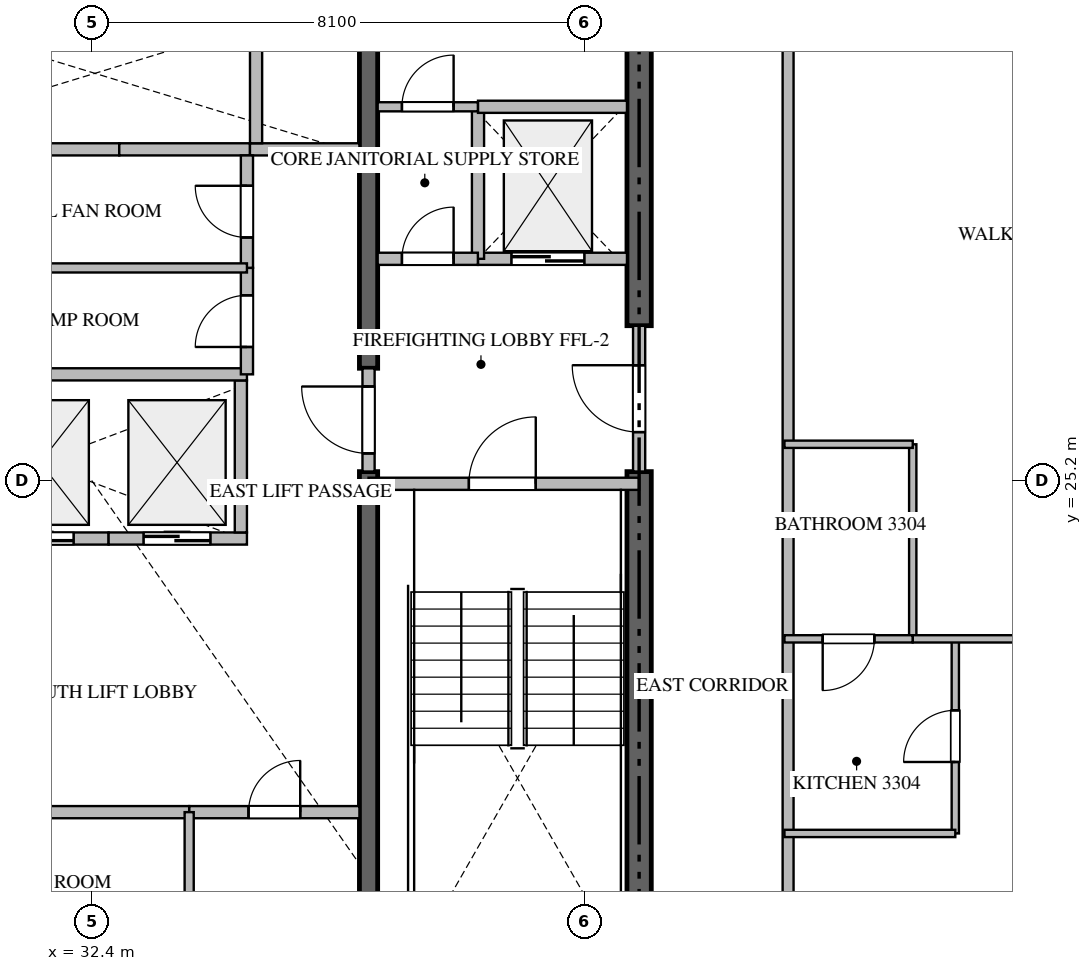
"""IFC4 building model, lengths in metres.
Left out: names, types, materials, properties, quantities, classifications, styles, units other than length and angle.
Written with IfcOpenShell. Run it as: python <this file> out.ifc"""

import sys

from ifc_helpers import new_model, si_unit, direction, frame, frame_2d, origin, place, context, subcontext, project, spatial, rectangle, extrude, source, transform, mapped, element, fill, save


model = new_model("IFC4")
c1 = context("Model", 3, precision=1e-05, world=origin(), true_north=direction((0.0, 1.0)))
c2 = subcontext(c1, "Body", "Model", "MODEL_VIEW")
j1 = project(units=[si_unit("LENGTHUNIT", "METRE"), si_unit("PLANEANGLEUNIT", "RADIAN")], contexts=[c1])
p1 = place(None, origin())
s1 = spatial("IfcSite", under=j1, at=p1, CompositionType="ELEMENT")
p2 = place(p1, origin())
s2 = spatial("IfcBuilding", under=s1, at=p2, CompositionType="ELEMENT")
p3 = place(p2, frame((0.0, 0.0, 135.15)))
s3 = spatial("IfcBuildingStorey", under=s2, at=p3, CompositionType="ELEMENT", Elevation=135.15)
p4 = place(p3, frame((41.4, 17.0, -0.26), z_axis=(0.0, 0.0, 1.0), x_axis=(0.0, 1.0, 0.0)))
e1 = element("IfcWall", 1, at=p4, inside=s3, PredefinedType="SHEAR", context=c2, shape_type="SweptSolid", body=[
    extrude(rectangle(XDim=8.35, YDim=0.4, at=frame_2d((4.175, 0.0))), origin(), (0.0, 0.0, 1.0), 3.748),
])
p5 = place(p3, frame((41.4, 27.75, -0.26), z_axis=(0.0, 0.0, 1.0), x_axis=(0.0, 1.0, 0.0)))
e2 = element("IfcWall", 2, at=p5, inside=s3, PredefinedType="SHEAR", context=c2, shape_type="SweptSolid", body=[
    extrude(rectangle(XDim=5.65, YDim=0.4, at=frame_2d((2.825, 0.0))), origin(), (0.0, 0.0, 1.0), 3.748),
])
p6 = place(p3, frame((36.95, 17.0, -0.26), z_axis=(0.0, 0.0, 1.0), x_axis=(0.0, 1.0, 0.0)))
e3 = element("IfcWall", 3, at=p6, inside=s3, PredefinedType="SHEAR", context=c2, shape_type="SweptSolid", body=[
    extrude(rectangle(XDim=8.35, YDim=0.3, at=frame_2d((4.175, 0.0))), origin(), (0.0, 0.0, 1.0), 3.748),
])
p7 = place(p3, frame((36.95, 27.05, -0.26), z_axis=(0.0, 0.0, 1.0), x_axis=(0.0, 1.0, 0.0)))
e4 = element("IfcWall", 4, at=p7, inside=s3, PredefinedType="SHEAR", context=c2, shape_type="SweptSolid", body=[
    extrude(rectangle(XDim=6.35, YDim=0.3, at=frame_2d((3.175, 0.0))), origin(), (0.0, 0.0, 1.0), 3.748),
])
p8 = place(p3, frame((36.95, 25.15, 0.0), z_axis=(0.0, 0.0, 1.0), x_axis=(1.0, 0.0, 0.0)))
e5 = element("IfcWall", 5, at=p8, inside=s3, PredefinedType="STANDARD", context=c2, shape_type="SweptSolid", body=[
    extrude(rectangle(XDim=4.45, YDim=0.2, at=frame_2d((2.225, 0.0))), origin(), (0.0, 0.0, 1.0), 3.49),
])
p9 = place(p8, frame((1.65, 0.0, 0.0)))
e6 = element("IfcOpeningElement", 6, at=p9, cuts=e5, PredefinedType="OPENING", context=c2, shape_type="SweptSolid", body=[
    extrude(rectangle(XDim=1.1, YDim=2.15, at=frame_2d((0.55, 1.075))), frame((0.0, 0.11, 0.0), z_axis=(0.0, -1.0, 0.0), x_axis=(1.0, 0.0, 0.0)), (0.0, 0.0, 1.0), 0.22),
])
p10 = place(p3, frame((38.75, 28.85, 0.0), z_axis=(0.0, 0.0, 1.0), x_axis=(1.0, 0.0, 0.0)))
e7 = element("IfcWall", 7, at=p10, inside=s3, PredefinedType="STANDARD", context=c2, shape_type="SweptSolid", body=[
    extrude(rectangle(XDim=2.45, YDim=0.2, at=frame_2d((1.225, 0.0))), origin(), (0.0, 0.0, 1.0), 3.49),
])
p11 = place(p10, frame((0.55, 0.0, 0.0)))
e8 = element("IfcOpeningElement", 8, at=p11, cuts=e7, PredefinedType="OPENING", context=c2, shape_type="SweptSolid", body=[
    extrude(rectangle(XDim=1.2, YDim=2.2, at=frame_2d((0.6, 1.1))), frame((0.0, 0.11, 0.0), z_axis=(0.0, -1.0, 0.0), x_axis=(1.0, 0.0, 0.0)), (0.0, 0.0, 1.0), 0.22),
])
p12 = place(p3, frame((30.425, 24.25, 0.0), z_axis=(0.0, 0.0, 1.0), x_axis=(1.0, 0.0, 0.0)))
e9 = element("IfcWall", 9, at=p12, inside=s3, PredefinedType="STANDARD", context=c2, shape_type="SweptSolid", body=[
    extrude(rectangle(XDim=2.25, YDim=0.2, at=frame_2d((1.125, 0.0))), origin(), (0.0, 0.0, 1.0), 3.49),
])
p13 = place(p12, frame((0.575, 0.0, 0.0)))
e10 = element("IfcOpeningElement", 10, at=p13, cuts=e9, PredefinedType="OPENING", context=c2, shape_type="SweptSolid", body=[
    extrude(rectangle(XDim=1.1, YDim=2.2, at=frame_2d((0.55, 1.1))), frame((0.0, 0.11, 0.0), z_axis=(0.0, -1.0, 0.0), x_axis=(1.0, 0.0, 0.0)), (0.0, 0.0, 1.0), 0.22),
])
p14 = place(p3, frame((32.675, 24.25, 0.0), z_axis=(0.0, 0.0, 1.0), x_axis=(1.0, 0.0, 0.0)))
e11 = element("IfcWall", 11, at=p14, inside=s3, PredefinedType="STANDARD", context=c2, shape_type="SweptSolid", body=[
    extrude(rectangle(XDim=2.275, YDim=0.2, at=frame_2d((1.137, 0.0))), origin(), (0.0, 0.0, 1.0), 3.49),
])
p15 = place(p14, frame((0.575, 0.0, 0.0)))
e12 = element("IfcOpeningElement", 12, at=p15, cuts=e11, PredefinedType="OPENING", context=c2, shape_type="SweptSolid", body=[
    extrude(rectangle(XDim=1.1, YDim=2.2, at=frame_2d((0.55, 1.1))), frame((0.0, 0.11, 0.0), z_axis=(0.0, -1.0, 0.0), x_axis=(1.0, 0.0, 0.0)), (0.0, 0.0, 1.0), 0.22),
])
p16 = place(p3, frame((34.85, 24.35, 0.0), z_axis=(0.0, 0.0, 1.0), x_axis=(0.0, 1.0, 0.0)))
e13 = element("IfcWall", 13, at=p16, inside=s3, PredefinedType="STANDARD", context=c2, shape_type="SweptSolid", body=[
    extrude(rectangle(XDim=2.5, YDim=0.2, at=frame_2d((1.25, 0.0))), origin(), (0.0, 0.0, 1.0), 3.49),
])
p17 = place(p3, frame((30.55, 30.65, 0.0), z_axis=(0.0, 0.0, 1.0), x_axis=(1.0, 0.0, 0.0)))
e14 = element("IfcWall", 14, at=p17, inside=s3, PredefinedType="STANDARD", context=c2, shape_type="SweptSolid", body=[
    extrude(rectangle(XDim=2.3, YDim=0.2, at=frame_2d((1.15, 0.0))), origin(), (0.0, 0.0, 1.0), 3.49),
])
p18 = place(p3, frame((32.85, 30.65, 0.0), z_axis=(0.0, 0.0, 1.0), x_axis=(1.0, 0.0, 0.0)))
e15 = element("IfcWall", 15, at=p18, inside=s3, PredefinedType="STANDARD", context=c2, shape_type="SweptSolid", body=[
    extrude(rectangle(XDim=2.15, YDim=0.2, at=frame_2d((1.075, 0.0))), origin(), (0.0, 0.0, 1.0), 3.49),
])
p19 = place(p3, frame((35.0, 30.65, 0.0), z_axis=(0.0, 0.0, 1.0), x_axis=(1.0, 0.0, 0.0)))
e16 = element("IfcWall", 16, at=p19, inside=s3, PredefinedType="STANDARD", context=c2, shape_type="SweptSolid", body=[
    extrude(rectangle(XDim=1.8, YDim=0.2, at=frame_2d((0.9, 0.0))), origin(), (0.0, 0.0, 1.0), 3.49),
])
p20 = place(p3, frame((35.1, 30.75, 0.0), z_axis=(0.0, 0.0, 1.0), x_axis=(0.0, 1.0, 0.0)))
e17 = element("IfcWall", 17, at=p20, inside=s3, PredefinedType="STANDARD", context=c2, shape_type="SweptSolid", body=[
    extrude(rectangle(XDim=2.65, YDim=0.2, at=frame_2d((1.325, 0.0))), origin(), (0.0, 0.0, 1.0), 3.49),
])
p21 = place(p3, frame((38.75, 28.85, 0.0), z_axis=(0.0, 0.0, 1.0), x_axis=(0.0, 1.0, 0.0)))
e18 = element("IfcWall", 18, at=p21, inside=s3, PredefinedType="STANDARD", context=c2, shape_type="SweptSolid", body=[
    extrude(rectangle(XDim=2.5, YDim=0.2, at=frame_2d((1.25, 0.0))), origin(), (0.0, 0.0, 1.0), 3.49),
])
p22 = place(p3, frame((38.75, 31.35, 0.0), z_axis=(0.0, 0.0, 1.0), x_axis=(1.0, 0.0, 0.0)))
e19 = element("IfcWall", 19, at=p22, inside=s3, PredefinedType="STANDARD", context=c2, shape_type="SweptSolid", body=[
    extrude(rectangle(XDim=2.45, YDim=0.2, at=frame_2d((1.225, 0.0))), origin(), (0.0, 0.0, 1.0), 3.49),
])
p23 = place(p3, frame((37.1, 28.85, 0.0), z_axis=(0.0, 0.0, 1.0), x_axis=(1.0, 0.0, 0.0)))
e20 = element("IfcWall", 20, at=p23, inside=s3, PredefinedType="STANDARD", context=c2, shape_type="SweptSolid", body=[
    extrude(rectangle(XDim=1.648, YDim=0.2, at=frame_2d((0.824, 0.0))), origin(), (0.0, 0.0, 1.0), 3.49),
])
p24 = place(p23, frame((0.399, 0.0, 0.0)))
e21 = element("IfcOpeningElement", 21, at=p24, cuts=e20, PredefinedType="OPENING", context=c2, shape_type="SweptSolid", body=[
    extrude(rectangle(XDim=0.85, YDim=2.1, at=frame_2d((0.425, 1.05))), frame((0.0, 0.11, 0.0), z_axis=(0.0, -1.0, 0.0), x_axis=(1.0, 0.0, 0.0)), (0.0, 0.0, 1.0), 0.22),
])
p25 = place(p3, frame((41.4, 25.352, 0.0), z_axis=(0.0, 0.0, 1.0), x_axis=(0.0, 1.0, 0.0)))
e22 = element("IfcWall", 22, at=p25, inside=s3, PredefinedType="STANDARD", context=c2, shape_type="SweptSolid", body=[
    extrude(rectangle(XDim=2.396, YDim=0.2, at=frame_2d((1.198, 0.0))), origin(), (0.0, 0.0, 1.0), 3.49),
])
p26 = place(p25, frame((0.648, 0.0, 0.0)))
e23 = element("IfcOpeningElement", 23, at=p26, cuts=e22, PredefinedType="OPENING", context=c2, shape_type="SweptSolid", body=[
    extrude(rectangle(XDim=1.1, YDim=2.15, at=frame_2d((0.55, 1.075))), frame((0.0, 0.11, 0.0), z_axis=(0.0, -1.0, 0.0), x_axis=(1.0, 0.0, 0.0)), (0.0, 0.0, 1.0), 0.22),
])
p27 = place(p3, frame((36.95, 25.352, 0.0), z_axis=(0.0, 0.0, 1.0), x_axis=(0.0, 1.0, 0.0)))
e24 = element("IfcWall", 24, at=p27, inside=s3, PredefinedType="STANDARD", context=c2, shape_type="SweptSolid", body=[
    extrude(rectangle(XDim=1.696, YDim=0.2, at=frame_2d((0.848, 0.0))), origin(), (0.0, 0.0, 1.0), 3.49),
])
p28 = place(p27, frame((0.298, 0.0, 0.0)))
e25 = element("IfcOpeningElement", 25, at=p28, cuts=e24, PredefinedType="OPENING", context=c2, shape_type="SweptSolid", body=[
    extrude(rectangle(XDim=1.1, YDim=2.15, at=frame_2d((0.55, 1.075))), frame((0.0, 0.11, 0.0), z_axis=(0.0, -1.0, 0.0), x_axis=(1.0, 0.0, 0.0)), (0.0, 0.0, 1.0), 0.22),
])
p29 = place(p3, frame((28.0, 26.95, 0.0), z_axis=(0.0, 0.0, 1.0), x_axis=(1.0, 0.0, 0.0)))
e26 = element("IfcWall", 26, at=p29, inside=s3, PredefinedType="STANDARD", context=c2, shape_type="SweptSolid", body=[
    extrude(rectangle(XDim=6.95, YDim=0.2, at=frame_2d((3.475, 0.0))), origin(), (0.0, 0.0, 1.0), 3.49),
])
p30 = place(p3, frame((37.1, 31.35, 0.0), z_axis=(0.0, 0.0, 1.0), x_axis=(1.0, 0.0, 0.0)))
e27 = element("IfcWall", 27, at=p30, inside=s3, PredefinedType="PARTITIONING", context=c2, shape_type="SweptSolid", body=[
    extrude(rectangle(XDim=1.648, YDim=0.15, at=frame_2d((0.824, 0.0))), origin(), (0.0, 0.0, 1.0), 3.49),
])
p31 = place(p30, frame((0.399, 0.0, 0.0)))
e28 = element("IfcOpeningElement", 28, at=p31, cuts=e27, PredefinedType="OPENING", context=c2, shape_type="SweptSolid", body=[
    extrude(rectangle(XDim=0.85, YDim=2.1, at=frame_2d((0.425, 1.05))), frame((0.0, 0.085, 0.0), z_axis=(0.0, -1.0, 0.0), x_axis=(1.0, 0.0, 0.0)), (0.0, 0.0, 1.0), 0.17),
])
p32 = place(p3, frame((34.95, 26.95, 0.0), z_axis=(0.0, 0.0, 1.0), x_axis=(0.0, 1.0, 0.0)))
e29 = element("IfcWall", 29, at=p32, inside=s3, PredefinedType="STANDARD", context=c2, shape_type="SweptSolid", body=[
    extrude(rectangle(XDim=1.75, YDim=0.2, at=frame_2d((0.875, 0.0))), origin(), (0.0, 0.0, 1.0), 3.49),
])
p33 = place(p32, frame((0.45, 0.0, 0.0)))
e30 = element("IfcOpeningElement", 30, at=p33, cuts=e29, PredefinedType="OPENING", context=c2, shape_type="SweptSolid", body=[
    extrude(rectangle(XDim=0.85, YDim=2.1, at=frame_2d((0.425, 1.05))), frame((0.0, 0.11, 0.0), z_axis=(0.0, -1.0, 0.0), x_axis=(1.0, 0.0, 0.0)), (0.0, 0.0, 1.0), 0.22),
])
p34 = place(p3, frame((34.95, 28.702, 0.0), z_axis=(0.0, 0.0, 1.0), x_axis=(0.0, 1.0, 0.0)))
e31 = element("IfcWall", 31, at=p34, inside=s3, PredefinedType="STANDARD", context=c2, shape_type="SweptSolid", body=[
    extrude(rectangle(XDim=1.848, YDim=0.2, at=frame_2d((0.924, 0.0))), origin(), (0.0, 0.0, 1.0), 3.49),
])
p35 = place(p34, frame((0.499, 0.0, 0.0)))
e32 = element("IfcOpeningElement", 32, at=p35, cuts=e31, PredefinedType="OPENING", context=c2, shape_type="SweptSolid", body=[
    extrude(rectangle(XDim=0.85, YDim=2.1, at=frame_2d((0.425, 1.05))), frame((0.0, 0.11, 0.0), z_axis=(0.0, -1.0, 0.0), x_axis=(1.0, 0.0, 0.0)), (0.0, 0.0, 1.0), 0.22),
])
p36 = place(p3, frame((28.0, 28.7, 0.0), z_axis=(0.0, 0.0, 1.0), x_axis=(1.0, 0.0, 0.0)))
e33 = element("IfcWall", 33, at=p36, inside=s3, PredefinedType="PARTITIONING", context=c2, shape_type="SweptSolid", body=[
    extrude(rectangle(XDim=6.95, YDim=0.15, at=frame_2d((3.475, 0.0))), origin(), (0.0, 0.0, 1.0), 3.49),
])
p37 = place(p3, frame((28.0, 19.75, 0.0), z_axis=(0.0, 0.0, 1.0), x_axis=(1.0, 0.0, 0.0)))
e34 = element("IfcWall", 34, at=p37, inside=s3, PredefinedType="STANDARD", context=c2, shape_type="SweptSolid", body=[
    extrude(rectangle(XDim=6.0, YDim=0.2, at=frame_2d((3.0, 0.0))), origin(), (0.0, 0.0, 1.0), 3.49),
])
p38 = place(p37, frame((2.55, 0.0, 0.0)))
e35 = element("IfcOpeningElement", 35, at=p38, cuts=e34, PredefinedType="OPENING", context=c2, shape_type="SweptSolid", body=[
    extrude(rectangle(XDim=0.9, YDim=2.1, at=frame_2d((0.45, 1.05))), frame((0.0, 0.11, 0.0), z_axis=(0.0, -1.0, 0.0), x_axis=(1.0, 0.0, 0.0)), (0.0, 0.0, 1.0), 0.22),
])
p39 = place(p3, frame((34.002, 19.75, 0.0), z_axis=(0.0, 0.0, 1.0), x_axis=(1.0, 0.0, 0.0)))
e36 = element("IfcWall", 36, at=p39, inside=s3, PredefinedType="STANDARD", context=c2, shape_type="SweptSolid", body=[
    extrude(rectangle(XDim=2.798, YDim=0.2, at=frame_2d((1.399, 0.0))), origin(), (0.0, 0.0, 1.0), 3.49),
])
p40 = place(p39, frame((0.974, 0.0, 0.0)))
e37 = element("IfcOpeningElement", 37, at=p40, cuts=e36, PredefinedType="OPENING", context=c2, shape_type="SweptSolid", body=[
    extrude(rectangle(XDim=0.85, YDim=2.1, at=frame_2d((0.425, 1.05))), frame((0.0, 0.11, 0.0), z_axis=(0.0, -1.0, 0.0), x_axis=(1.0, 0.0, 0.0)), (0.0, 0.0, 1.0), 0.22),
])
p41 = place(p3, frame((34.0, 17.02, 0.0), z_axis=(0.0, 0.0, 1.0), x_axis=(0.0, 1.0, 0.0)))
e38 = element("IfcWall", 38, at=p41, inside=s3, PredefinedType="PARTITIONING", context=c2, shape_type="SweptSolid", body=[
    extrude(rectangle(XDim=2.73, YDim=0.15, at=frame_2d((1.365, 0.0))), origin(), (0.0, 0.0, 1.0), 3.49),
])
p42 = place(p3, frame((43.85, 14.9, 0.0), z_axis=(0.0, 0.0, 1.0), x_axis=(0.0, 1.0, 0.0)))
e39 = element("IfcWall", 39, at=p42, inside=s3, PredefinedType="PARTITIONING", context=c2, shape_type="SweptSolid", body=[
    extrude(rectangle(XDim=18.7, YDim=0.18, at=frame_2d((9.35, 0.0))), origin(), (0.0, 0.0, 1.0), 3.49),
])
p43 = place(p42, frame((1.805, 0.0, 0.0)))
e40 = element("IfcOpeningElement", 40, at=p43, cuts=e39, PredefinedType="OPENING", context=c2, shape_type="SweptSolid", body=[
    extrude(rectangle(XDim=1.0, YDim=2.15, at=frame_2d((0.5, 1.075))), frame((0.0, 0.1, 0.0), z_axis=(0.0, -1.0, 0.0), x_axis=(1.0, 0.0, 0.0)), (0.0, 0.0, 1.0), 0.2),
])
p44 = place(p3, frame((46.6, 19.4, 0.0), z_axis=(0.0, 0.0, 1.0), x_axis=(0.0, 1.0, 0.0)))
e41 = element("IfcWall", 41, at=p44, inside=s3, PredefinedType="PARTITIONING", context=c2, shape_type="SweptSolid", body=[
    extrude(rectangle(XDim=3.2, YDim=0.12, at=frame_2d((1.6, 0.0))), origin(), (0.0, 0.0, 1.0), 3.49),
])
p45 = place(p44, frame((1.175, 0.0, 0.0)))
e42 = element("IfcOpeningElement", 42, at=p45, cuts=e41, PredefinedType="OPENING", context=c2, shape_type="SweptSolid", body=[
    extrude(rectangle(XDim=0.85, YDim=2.1, at=frame_2d((0.425, 1.05))), frame((0.0, 0.07, 0.0), z_axis=(0.0, -1.0, 0.0), x_axis=(1.0, 0.0, 0.0)), (0.0, 0.0, 1.0), 0.14),
])
p46 = place(p3, frame((46.6, 19.4, 0.0), z_axis=(0.0, 0.0, 1.0), x_axis=(-1.0, 0.0, 0.0)))
e43 = element("IfcWall", 43, at=p46, inside=s3, PredefinedType="PARTITIONING", context=c2, shape_type="SweptSolid", body=[
    extrude(rectangle(XDim=2.81, YDim=0.12, at=frame_2d((1.405, 0.0))), origin(), (0.0, 0.0, 1.0), 3.49),
])
p47 = place(p3, frame((45.9, 22.6, 0.0), z_axis=(0.0, 0.0, 1.0), x_axis=(0.0, 1.0, 0.0)))
e44 = element("IfcWall", 44, at=p47, inside=s3, PredefinedType="PARTITIONING", context=c2, shape_type="SweptSolid", body=[
    extrude(rectangle(XDim=3.2, YDim=0.12, at=frame_2d((1.6, 0.0))), origin(), (0.0, 0.0, 1.0), 3.49),
])
p48 = place(p3, frame((45.9, 25.8, 0.0), z_axis=(0.0, 0.0, 1.0), x_axis=(-1.0, 0.0, 0.0)))
e45 = element("IfcWall", 45, at=p48, inside=s3, PredefinedType="PARTITIONING", context=c2, shape_type="SweptSolid", body=[
    extrude(rectangle(XDim=2.11, YDim=0.12, at=frame_2d((1.055, 0.0))), origin(), (0.0, 0.0, 1.0), 3.49),
])
p49 = place(p3, frame((53.024, 22.6, 0.0), z_axis=(0.0, 0.0, 1.0), x_axis=(-1.0, 0.0, 0.0)))
e46 = element("IfcWall", 46, at=p49, inside=s3, PredefinedType="PARTITIONING", context=c2, shape_type="SweptSolid", body=[
    extrude(rectangle(XDim=7.124, YDim=0.12, at=frame_2d((3.562, 0.0))), origin(), (0.0, 0.0, 1.0), 3.49),
])
p50 = place(p49, frame((3.137, 0.0, 0.0)))
e47 = element("IfcOpeningElement", 47, at=p50, cuts=e46, PredefinedType="OPENING", context=c2, shape_type="SweptSolid", body=[
    extrude(rectangle(XDim=0.85, YDim=2.1, at=frame_2d((0.425, 1.05))), frame((0.0, 0.07, 0.0), z_axis=(0.0, -1.0, 0.0), x_axis=(1.0, 0.0, 0.0)), (0.0, 0.0, 1.0), 0.14),
])
p51 = place(p3, frame((45.898, 22.6, 0.0), z_axis=(0.0, 0.0, 1.0), x_axis=(-1.0, 0.0, 0.0)))
e48 = element("IfcWall", 48, at=p51, inside=s3, PredefinedType="PARTITIONING", context=c2, shape_type="SweptSolid", body=[
    extrude(rectangle(XDim=2.108, YDim=0.12, at=frame_2d((1.054, 0.0))), origin(), (0.0, 0.0, 1.0), 3.49),
])
p52 = place(p51, frame((0.629, 0.0, 0.0)))
e49 = element("IfcOpeningElement", 49, at=p52, cuts=e48, PredefinedType="OPENING", context=c2, shape_type="SweptSolid", body=[
    extrude(rectangle(XDim=0.85, YDim=2.1, at=frame_2d((0.425, 1.05))), frame((0.0, 0.07, 0.0), z_axis=(0.0, -1.0, 0.0), x_axis=(1.0, 0.0, 0.0)), (0.0, 0.0, 1.0), 0.14),
])
m1 = source(origin(), c2, "Body", "SweptSolid", [
    extrude(rectangle(XDim=1.1, YDim=2.15, at=frame_2d((0.55, 1.075))), frame((0.0, 0.025, 0.0), z_axis=(0.0, -1.0, 0.0), x_axis=(1.0, 0.0, 0.0)), (0.0, 0.0, 1.0), 0.05),
])
p53 = place(p9, origin())
e50 = element("IfcDoor", 50, at=p53, inside=s3, OperationType="SINGLE_SWING_RIGHT", PredefinedType="DOOR", context=c2, shape_type="MappedRepresentation", body=[
    mapped(m1, transform((0.0, 0.0, 0.0), scale=1.0)),
])
fill(e6, e50)
m2 = source(origin(), c2, "Body", "SweptSolid", [
    extrude(rectangle(XDim=1.2, YDim=2.2, at=frame_2d((0.6, 1.1))), frame((0.0, 0.025, 0.0), z_axis=(0.0, -1.0, 0.0), x_axis=(1.0, 0.0, 0.0)), (0.0, 0.0, 1.0), 0.05),
])
p54 = place(p11, origin())
e51 = element("IfcDoor", 51, at=p54, inside=s3, OperationType="DOUBLE_DOOR_SLIDING", PredefinedType="DOOR", context=c2, shape_type="MappedRepresentation", body=[
    mapped(m2, transform((0.0, 0.0, 0.0), scale=1.0)),
])
fill(e8, e51)
m3 = source(origin(), c2, "Body", "SweptSolid", [
    extrude(rectangle(XDim=1.1, YDim=2.2, at=frame_2d((0.55, 1.1))), frame((0.0, 0.025, 0.0), z_axis=(0.0, -1.0, 0.0), x_axis=(1.0, 0.0, 0.0)), (0.0, 0.0, 1.0), 0.05),
])
p55 = place(p13, origin())
e52 = element("IfcDoor", 52, at=p55, inside=s3, OperationType="DOUBLE_DOOR_SLIDING", PredefinedType="DOOR", context=c2, shape_type="MappedRepresentation", body=[
    mapped(m3, transform((0.0, 0.0, 0.0), scale=1.0)),
])
fill(e10, e52)
p56 = place(p15, origin())
e53 = element("IfcDoor", 53, at=p56, inside=s3, OperationType="DOUBLE_DOOR_SLIDING", PredefinedType="DOOR", context=c2, shape_type="MappedRepresentation", body=[
    mapped(m3, transform((0.0, 0.0, 0.0), scale=1.0)),
])
fill(e12, e53)
m4 = source(origin(), c2, "Body", "SweptSolid", [
    extrude(rectangle(XDim=0.85, YDim=2.1, at=frame_2d((0.425, 1.05))), frame((0.0, 0.025, 0.0), z_axis=(0.0, -1.0, 0.0), x_axis=(1.0, 0.0, 0.0)), (0.0, 0.0, 1.0), 0.05),
])
p57 = place(p24, origin())
e54 = element("IfcDoor", 54, at=p57, inside=s3, OperationType="SINGLE_SWING_RIGHT", PredefinedType="DOOR", context=c2, shape_type="MappedRepresentation", body=[
    mapped(m4, transform((0.0, 0.0, 0.0), scale=1.0)),
])
fill(e21, e54)
p58 = place(p26, origin())
e55 = element("IfcDoor", 55, at=p58, inside=s3, OperationType="SINGLE_SWING_RIGHT", PredefinedType="DOOR", context=c2, shape_type="MappedRepresentation", body=[
    mapped(m1, transform((0.0, 0.0, 0.0), scale=1.0)),
])
fill(e23, e55)
p59 = place(p28, origin())
e56 = element("IfcDoor", 56, at=p59, inside=s3, OperationType="SINGLE_SWING_RIGHT", PredefinedType="DOOR", context=c2, shape_type="MappedRepresentation", body=[
    mapped(m1, transform((0.0, 0.0, 0.0), scale=1.0)),
])
fill(e25, e56)
p60 = place(p31, origin())
e57 = element("IfcDoor", 57, at=p60, inside=s3, OperationType="SINGLE_SWING_RIGHT", PredefinedType="DOOR", context=c2, shape_type="MappedRepresentation", body=[
    mapped(m4, transform((0.0, 0.0, 0.0), scale=1.0)),
])
fill(e28, e57)
p61 = place(p33, origin())
e58 = element("IfcDoor", 58, at=p61, inside=s3, OperationType="SINGLE_SWING_LEFT", PredefinedType="DOOR", context=c2, shape_type="MappedRepresentation", body=[
    mapped(m4, transform((0.0, 0.0, 0.0), scale=1.0)),
])
fill(e30, e58)
p62 = place(p35, origin())
e59 = element("IfcDoor", 59, at=p62, inside=s3, OperationType="SINGLE_SWING_RIGHT", PredefinedType="DOOR", context=c2, shape_type="MappedRepresentation", body=[
    mapped(m4, transform((0.0, 0.0, 0.0), scale=1.0)),
])
fill(e32, e59)
p63 = place(p40, origin())
e60 = element("IfcDoor", 60, at=p63, inside=s3, OperationType="SINGLE_SWING_RIGHT", PredefinedType="DOOR", context=c2, shape_type="MappedRepresentation", body=[
    mapped(m4, transform((0.0, 0.0, 0.0), scale=1.0)),
])
fill(e37, e60)
p64 = place(p45, origin())
e61 = element("IfcDoor", 61, at=p64, inside=s3, OperationType="SINGLE_SWING_LEFT", PredefinedType="DOOR", context=c2, shape_type="MappedRepresentation", body=[
    mapped(m4, transform((0.0, 0.0, 0.0), scale=1.0)),
])
fill(e42, e61)
p65 = place(p52, origin())
e62 = element("IfcDoor", 62, at=p65, inside=s3, OperationType="SINGLE_SWING_RIGHT", PredefinedType="DOOR", context=c2, shape_type="MappedRepresentation", body=[
    mapped(m4, transform((0.0, 0.0, 0.0), scale=1.0)),
])
fill(e49, e62)
save(model, sys.argv[1])
